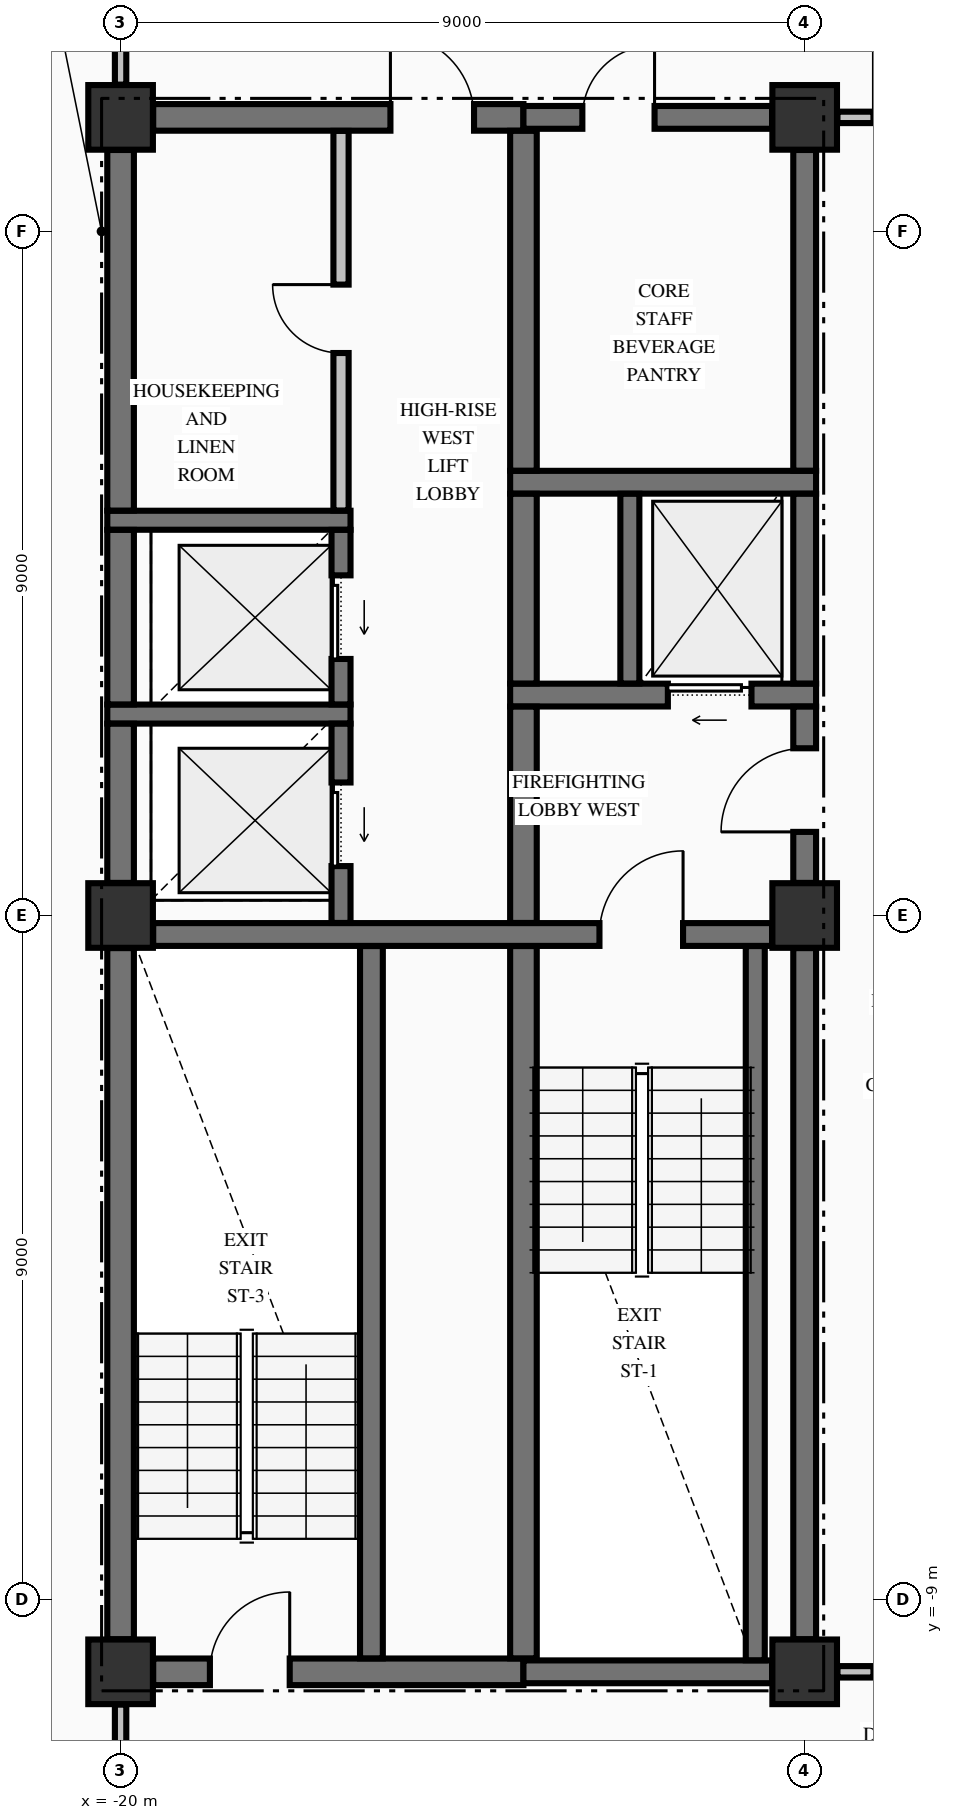
"""IFC4 building model, lengths in metres.
Left out: names, types, materials, properties, quantities, classifications, styles, units other than length and angle.
Written with IfcOpenShell. Run it as: python <this file> out.ifc"""

import sys

from ifc_helpers import new_model, si_unit, direction, frame, frame_2d, origin, origin_2d, place, context, subcontext, project, spatial, rectangle, extrude, element, fill, save


model = new_model("IFC4")
c1 = context("Model", 3, precision=1e-05, world=origin(), true_north=direction((0.0, 1.0)))
c2 = subcontext(c1, "Body", "Model", "MODEL_VIEW")
j1 = project(units=[si_unit("LENGTHUNIT", "METRE"), si_unit("PLANEANGLEUNIT", "RADIAN")], contexts=[c1])
p1 = place(None, origin())
s1 = spatial("IfcSite", under=j1, at=p1, CompositionType="ELEMENT")
p2 = place(p1, origin())
s2 = spatial("IfcBuilding", under=s1, at=p2, CompositionType="ELEMENT")
p3 = place(p2, frame((0.0, 0.0, 179.66)))
s3 = spatial("IfcBuildingStorey", under=s2, at=p3, CompositionType="ELEMENT", Elevation=179.66)
for number, where, z_axis, x_axis in (
    (1, (-20.0, -9.95, -0.25), (0.0, 0.0, 1.0), (1.0, 0.0, 0.0)),
    (2, (-20.0, 10.5, -0.25), (0.0, 0.0, 1.0), (1.0, 0.0, 0.0)),
    (3, (-11.0, -9.95, -0.25), (0.0, 0.0, 1.0), (1.0, 0.0, 0.0)),
    (4, (-11.0, 0.0, -0.25), (0.0, 0.0, 1.0), (1.0, 0.0, 0.0)),
    (5, (-11.0, 10.5, -0.25), (0.0, 0.0, 1.0), (1.0, 0.0, 0.0)),
    (6, (-20.0, 0.0, -0.25), (0.0, 0.0, 1.0), (1.0, 0.0, 0.0)),
):
    element("IfcColumn", number, at=place(p3, frame(where, z_axis=z_axis, x_axis=x_axis)), inside=s3, PredefinedType="COLUMN", context=c2, shape_type="SweptSolid", body=[
        extrude(rectangle(XDim=0.85, YDim=0.85, at=origin_2d()), origin(), (0.0, 0.0, 1.0), 3.4),
    ])
p4 = place(p3, frame((-19.571, -9.95, 0.0), z_axis=(0.0, 0.0, 1.0), x_axis=(1.0, 0.0, 0.0)))
e7 = element("IfcWall", 7, at=p4, inside=s3, PredefinedType="SHEAR", context=c2, shape_type="SweptSolid", body=[
    extrude(rectangle(XDim=4.871, YDim=0.35, at=frame_2d((2.436, 0.0))), origin(), (0.0, 0.0, 1.0), 3.15),
])
p5 = place(p4, frame((0.746, 0.0, 0.0)))
e8 = element("IfcOpeningElement", 8, at=p5, cuts=e7, PredefinedType="OPENING", context=c2, shape_type="SweptSolid", body=[
    extrude(rectangle(XDim=1.05, YDim=2.15, at=frame_2d((0.525, 1.075))), frame((0.0, 0.185, 0.0), z_axis=(0.0, -1.0, 0.0), x_axis=(1.0, 0.0, 0.0)), (0.0, 0.0, 1.0), 0.37),
])
p6 = place(p3, frame((-14.7, -9.95, 0.0), z_axis=(0.0, 0.0, 1.0), x_axis=(1.0, 0.0, 0.0)))
e9 = element("IfcWall", 9, at=p6, inside=s3, PredefinedType="SHEAR", context=c2, shape_type="SweptSolid", body=[
    extrude(rectangle(XDim=3.271, YDim=0.3, at=frame_2d((1.635, 0.0))), origin(), (0.0, 0.0, 1.0), 3.15),
])
p7 = place(p3, frame((-19.571, -0.25, 0.0), z_axis=(0.0, 0.0, 1.0), x_axis=(1.0, 0.0, 0.0)))
e10 = element("IfcWall", 10, at=p7, inside=s3, PredefinedType="SHEAR", context=c2, shape_type="SweptSolid", body=[
    extrude(rectangle(XDim=8.142, YDim=0.3, at=frame_2d((4.071, 0.0))), origin(), (0.0, 0.0, 1.0), 3.15),
])
p8 = place(p7, frame((5.871, 0.0, 0.0)))
e11 = element("IfcOpeningElement", 11, at=p8, cuts=e10, PredefinedType="OPENING", context=c2, shape_type="SweptSolid", body=[
    extrude(rectangle(XDim=1.1, YDim=2.15, at=frame_2d((0.55, 1.075))), frame((0.0, 0.16, 0.0), z_axis=(0.0, -1.0, 0.0), x_axis=(1.0, 0.0, 0.0)), (0.0, 0.0, 1.0), 0.32),
])
p9 = place(p3, frame((-20.175, 2.65, 0.0), z_axis=(0.0, 0.0, 1.0), x_axis=(1.0, 0.0, 0.0)))
e12 = element("IfcWall", 12, at=p9, inside=s3, PredefinedType="SOLIDWALL", context=c2, shape_type="SweptSolid", body=[
    extrude(rectangle(XDim=3.2, YDim=0.25, at=frame_2d((1.6, 0.0))), origin(), (0.0, 0.0, 1.0), 3.15),
])
p10 = place(p3, frame((-14.875, 2.9, 0.0), z_axis=(0.0, 0.0, 1.0), x_axis=(1.0, 0.0, 0.0)))
e13 = element("IfcWall", 13, at=p10, inside=s3, PredefinedType="SHEAR", context=c2, shape_type="SweptSolid", body=[
    extrude(rectangle(XDim=4.025, YDim=0.3, at=frame_2d((2.012, 0.0))), origin(), (0.0, 0.0, 1.0), 3.15),
])
p11 = place(p10, frame((2.075, 0.0, 0.0)))
e14 = element("IfcOpeningElement", 14, at=p11, cuts=e13, PredefinedType="OPENING", context=c2, shape_type="SweptSolid", body=[
    extrude(rectangle(XDim=1.1, YDim=2.2, at=frame_2d((0.55, 1.1))), frame((0.0, 0.16, 0.0), z_axis=(0.0, -1.0, 0.0), x_axis=(1.0, 0.0, 0.0)), (0.0, 0.0, 1.0), 0.32),
])
p12 = place(p3, frame((-20.175, 5.2, 0.0), z_axis=(0.0, 0.0, 1.0), x_axis=(1.0, 0.0, 0.0)))
e15 = element("IfcWall", 15, at=p12, inside=s3, PredefinedType="SOLIDWALL", context=c2, shape_type="SweptSolid", body=[
    extrude(rectangle(XDim=3.2, YDim=0.25, at=frame_2d((1.6, 0.0))), origin(), (0.0, 0.0, 1.0), 3.15),
])
p13 = place(p3, frame((-14.875, 5.7, 0.0), z_axis=(0.0, 0.0, 1.0), x_axis=(1.0, 0.0, 0.0)))
e16 = element("IfcWall", 16, at=p13, inside=s3, PredefinedType="SHEAR", context=c2, shape_type="SweptSolid", body=[
    extrude(rectangle(XDim=4.025, YDim=0.3, at=frame_2d((2.012, 0.0))), origin(), (0.0, 0.0, 1.0), 3.15),
])
p14 = place(p3, frame((-19.571, 10.5, 0.0), z_axis=(0.0, 0.0, 1.0), x_axis=(1.0, 0.0, 0.0)))
e17 = element("IfcWall", 17, at=p14, inside=s3, PredefinedType="SHEAR", context=c2, shape_type="SweptSolid", body=[
    extrude(rectangle(XDim=4.871, YDim=0.35, at=frame_2d((2.436, 0.0))), origin(), (0.0, 0.0, 1.0), 3.15),
])
p15 = place(p14, frame((3.121, 0.0, 0.0)))
e18 = element("IfcOpeningElement", 18, at=p15, cuts=e17, PredefinedType="OPENING", context=c2, shape_type="SweptSolid", body=[
    extrude(rectangle(XDim=1.1, YDim=2.15, at=frame_2d((0.55, 1.075))), frame((0.0, 0.185, 0.0), z_axis=(0.0, -1.0, 0.0), x_axis=(1.0, 0.0, 0.0)), (0.0, 0.0, 1.0), 0.37),
])
p16 = place(p3, frame((-14.7, 10.5, 0.0), z_axis=(0.0, 0.0, 1.0), x_axis=(1.0, 0.0, 0.0)))
e19 = element("IfcWall", 19, at=p16, inside=s3, PredefinedType="SHEAR", context=c2, shape_type="SweptSolid", body=[
    extrude(rectangle(XDim=3.271, YDim=0.3, at=frame_2d((1.635, 0.0))), origin(), (0.0, 0.0, 1.0), 3.15),
])
p17 = place(p16, frame((0.775, 0.0, 0.0)))
e20 = element("IfcOpeningElement", 20, at=p17, cuts=e19, PredefinedType="OPENING", context=c2, shape_type="SweptSolid", body=[
    extrude(rectangle(XDim=0.95, YDim=2.15, at=frame_2d((0.475, 1.075))), frame((0.0, 0.16, 0.0), z_axis=(0.0, -1.0, 0.0), x_axis=(1.0, 0.0, 0.0)), (0.0, 0.0, 1.0), 0.32),
])
p18 = place(p3, frame((-10.569, -9.95, 0.0), z_axis=(0.0, 0.0, 1.0), x_axis=(1.0, 0.0, 0.0)))
e21 = element("IfcWall", 21, at=p18, inside=s3, PredefinedType="PARTITIONING", context=c2, shape_type="SweptSolid", body=[
    extrude(rectangle(XDim=21.138, YDim=0.15, at=frame_2d((10.569, 0.0))), origin(), (0.0, 0.0, 1.0), 3.15),
])
p19 = place(p18, frame((0.474, 0.0, 0.0)))
e22 = element("IfcOpeningElement", 22, at=p19, cuts=e21, PredefinedType="OPENING", context=c2, shape_type="SweptSolid", body=[
    extrude(rectangle(XDim=1.05, YDim=2.15, at=frame_2d((0.525, 1.075))), frame((0.0, 0.085, 0.0), z_axis=(0.0, -1.0, 0.0), x_axis=(1.0, 0.0, 0.0)), (0.0, 0.0, 1.0), 0.17),
])
p20 = place(p18, frame((19.614, 0.0, 0.0)))
e23 = element("IfcOpeningElement", 23, at=p20, cuts=e21, PredefinedType="OPENING", context=c2, shape_type="SweptSolid", body=[
    extrude(rectangle(XDim=1.05, YDim=2.15, at=frame_2d((0.525, 1.075))), frame((0.0, 0.085, 0.0), z_axis=(0.0, -1.0, 0.0), x_axis=(1.0, 0.0, 0.0)), (0.0, 0.0, 1.0), 0.17),
])
p21 = place(p18, frame((11.774, 0.0, 0.0)))
e24 = element("IfcOpeningElement", 24, at=p21, cuts=e21, PredefinedType="OPENING", context=c2, shape_type="SweptSolid", body=[
    extrude(rectangle(XDim=0.95, YDim=2.15, at=frame_2d((0.475, 1.075))), frame((0.0, 0.085, 0.0), z_axis=(0.0, -1.0, 0.0), x_axis=(1.0, 0.0, 0.0)), (0.0, 0.0, 1.0), 0.17),
])
p22 = place(p3, frame((-10.569, 10.5, 0.0), z_axis=(0.0, 0.0, 1.0), x_axis=(1.0, 0.0, 0.0)))
e25 = element("IfcWall", 25, at=p22, inside=s3, PredefinedType="PARTITIONING", context=c2, shape_type="SweptSolid", body=[
    extrude(rectangle(XDim=21.138, YDim=0.15, at=frame_2d((10.569, 0.0))), origin(), (0.0, 0.0, 1.0), 3.15),
])
p23 = place(p22, frame((0.474, 0.0, 0.0)))
e26 = element("IfcOpeningElement", 26, at=p23, cuts=e25, PredefinedType="OPENING", context=c2, shape_type="SweptSolid", body=[
    extrude(rectangle(XDim=1.05, YDim=2.15, at=frame_2d((0.525, 1.075))), frame((0.0, 0.085, 0.0), z_axis=(0.0, -1.0, 0.0), x_axis=(1.0, 0.0, 0.0)), (0.0, 0.0, 1.0), 0.17),
])
p24 = place(p22, frame((19.614, 0.0, 0.0)))
e27 = element("IfcOpeningElement", 27, at=p24, cuts=e25, PredefinedType="OPENING", context=c2, shape_type="SweptSolid", body=[
    extrude(rectangle(XDim=1.05, YDim=2.15, at=frame_2d((0.525, 1.075))), frame((0.0, 0.085, 0.0), z_axis=(0.0, -1.0, 0.0), x_axis=(1.0, 0.0, 0.0)), (0.0, 0.0, 1.0), 0.17),
])
p25 = place(p3, frame((-20.0, -9.521, 0.0), z_axis=(0.0, 0.0, 1.0), x_axis=(0.0, 1.0, 0.0)))
e28 = element("IfcWall", 28, at=p25, inside=s3, PredefinedType="SHEAR", context=c2, shape_type="SweptSolid", body=[
    extrude(rectangle(XDim=9.092, YDim=0.35, at=frame_2d((4.546, 0.0))), origin(), (0.0, 0.0, 1.0), 3.15),
])
p26 = place(p3, frame((-20.0, 0.429, 0.0), z_axis=(0.0, 0.0, 1.0), x_axis=(0.0, 1.0, 0.0)))
e29 = element("IfcWall", 29, at=p26, inside=s3, PredefinedType="SHEAR", context=c2, shape_type="SweptSolid", body=[
    extrude(rectangle(XDim=2.094, YDim=0.35, at=frame_2d((1.047, 0.0))), origin(), (0.0, 0.0, 1.0), 3.15),
])
p27 = place(p3, frame((-20.0, 2.777, 0.0), z_axis=(0.0, 0.0, 1.0), x_axis=(0.0, 1.0, 0.0)))
e30 = element("IfcWall", 30, at=p27, inside=s3, PredefinedType="SHEAR", context=c2, shape_type="SweptSolid", body=[
    extrude(rectangle(XDim=2.296, YDim=0.35, at=frame_2d((1.148, 0.0))), origin(), (0.0, 0.0, 1.0), 3.15),
])
p28 = place(p3, frame((-20.0, 5.327, 0.0), z_axis=(0.0, 0.0, 1.0), x_axis=(0.0, 1.0, 0.0)))
e31 = element("IfcWall", 31, at=p28, inside=s3, PredefinedType="SHEAR", context=c2, shape_type="SweptSolid", body=[
    extrude(rectangle(XDim=4.744, YDim=0.35, at=frame_2d((2.372, 0.0))), origin(), (0.0, 0.0, 1.0), 3.15),
])
p29 = place(p3, frame((-17.1, -0.098, 0.0), z_axis=(0.0, 0.0, 1.0), x_axis=(0.0, 1.0, 0.0)))
e32 = element("IfcWall", 32, at=p29, inside=s3, PredefinedType="SOLIDWALL", context=c2, shape_type="SweptSolid", body=[
    extrude(rectangle(XDim=2.621, YDim=0.25, at=frame_2d((1.311, 0.0))), origin(), (0.0, 0.0, 1.0), 3.15),
])
p30 = place(p29, frame((0.748, 0.0, 0.0)))
e33 = element("IfcOpeningElement", 33, at=p30, cuts=e32, PredefinedType="OPENING", context=c2, shape_type="SweptSolid", body=[
    extrude(rectangle(XDim=1.1, YDim=2.2, at=frame_2d((0.55, 1.1))), frame((0.0, 0.135, 0.0), z_axis=(0.0, -1.0, 0.0), x_axis=(1.0, 0.0, 0.0)), (0.0, 0.0, 1.0), 0.27),
])
p31 = place(p3, frame((-17.1, 2.777, 0.0), z_axis=(0.0, 0.0, 1.0), x_axis=(0.0, 1.0, 0.0)))
e34 = element("IfcWall", 34, at=p31, inside=s3, PredefinedType="SOLIDWALL", context=c2, shape_type="SweptSolid", body=[
    extrude(rectangle(XDim=2.296, YDim=0.25, at=frame_2d((1.148, 0.0))), origin(), (0.0, 0.0, 1.0), 3.15),
])
p32 = place(p31, frame((0.598, 0.0, 0.0)))
e35 = element("IfcOpeningElement", 35, at=p32, cuts=e34, PredefinedType="OPENING", context=c2, shape_type="SweptSolid", body=[
    extrude(rectangle(XDim=1.1, YDim=2.2, at=frame_2d((0.55, 1.1))), frame((0.0, 0.135, 0.0), z_axis=(0.0, -1.0, 0.0), x_axis=(1.0, 0.0, 0.0)), (0.0, 0.0, 1.0), 0.27),
])
p33 = place(p3, frame((-16.7, -9.773, 0.0), z_axis=(0.0, 0.0, 1.0), x_axis=(0.0, 1.0, 0.0)))
e36 = element("IfcWall", 36, at=p33, inside=s3, PredefinedType="SHEAR", context=c2, shape_type="SweptSolid", body=[
    extrude(rectangle(XDim=9.371, YDim=0.3, at=frame_2d((4.686, 0.0))), origin(), (0.0, 0.0, 1.0), 3.15),
])
p34 = place(p3, frame((-14.7, -9.773, 0.0), z_axis=(0.0, 0.0, 1.0), x_axis=(0.0, 1.0, 0.0)))
e37 = element("IfcWall", 37, at=p34, inside=s3, PredefinedType="SHEAR", context=c2, shape_type="SweptSolid", body=[
    extrude(rectangle(XDim=9.371, YDim=0.35, at=frame_2d((4.686, 0.0))), origin(), (0.0, 0.0, 1.0), 3.15),
])
p35 = place(p3, frame((-14.7, -0.098, 0.0), z_axis=(0.0, 0.0, 1.0), x_axis=(0.0, 1.0, 0.0)))
e38 = element("IfcWall", 38, at=p35, inside=s3, PredefinedType="SHEAR", context=c2, shape_type="SweptSolid", body=[
    extrude(rectangle(XDim=2.846, YDim=0.35, at=frame_2d((1.423, 0.0))), origin(), (0.0, 0.0, 1.0), 3.15),
])
p36 = place(p3, frame((-14.7, 3.052, 0.0), z_axis=(0.0, 0.0, 1.0), x_axis=(0.0, 1.0, 0.0)))
e39 = element("IfcWall", 39, at=p36, inside=s3, PredefinedType="SHEAR", context=c2, shape_type="SweptSolid", body=[
    extrude(rectangle(XDim=2.496, YDim=0.35, at=frame_2d((1.248, 0.0))), origin(), (0.0, 0.0, 1.0), 3.15),
])
p37 = place(p3, frame((-14.7, 5.852, 0.0), z_axis=(0.0, 0.0, 1.0), x_axis=(0.0, 1.0, 0.0)))
e40 = element("IfcWall", 40, at=p37, inside=s3, PredefinedType="SHEAR", context=c2, shape_type="SweptSolid", body=[
    extrude(rectangle(XDim=4.471, YDim=0.35, at=frame_2d((2.235, 0.0))), origin(), (0.0, 0.0, 1.0), 3.15),
])
p38 = place(p3, frame((-13.3, 3.052, 0.0), z_axis=(0.0, 0.0, 1.0), x_axis=(0.0, 1.0, 0.0)))
e41 = element("IfcWall", 41, at=p38, inside=s3, PredefinedType="SOLIDWALL", context=c2, shape_type="SweptSolid", body=[
    extrude(rectangle(XDim=2.496, YDim=0.25, at=frame_2d((1.248, 0.0))), origin(), (0.0, 0.0, 1.0), 3.15),
])
p39 = place(p3, frame((-11.65, -9.798, 0.0), z_axis=(0.0, 0.0, 1.0), x_axis=(0.0, 1.0, 0.0)))
e42 = element("IfcWall", 42, at=p39, inside=s3, PredefinedType="SOLIDWALL", context=c2, shape_type="SweptSolid", body=[
    extrude(rectangle(XDim=9.396, YDim=0.25, at=frame_2d((4.698, 0.0))), origin(), (0.0, 0.0, 1.0), 3.15),
])
p40 = place(p3, frame((-11.0, -9.521, 0.0), z_axis=(0.0, 0.0, 1.0), x_axis=(0.0, 1.0, 0.0)))
e43 = element("IfcWall", 43, at=p40, inside=s3, PredefinedType="SHEAR", context=c2, shape_type="SweptSolid", body=[
    extrude(rectangle(XDim=9.092, YDim=0.3, at=frame_2d((4.546, 0.0))), origin(), (0.0, 0.0, 1.0), 3.15),
])
p41 = place(p3, frame((-11.0, 0.429, 0.0), z_axis=(0.0, 0.0, 1.0), x_axis=(0.0, 1.0, 0.0)))
e44 = element("IfcWall", 44, at=p41, inside=s3, PredefinedType="SHEAR", context=c2, shape_type="SweptSolid", body=[
    extrude(rectangle(XDim=2.319, YDim=0.3, at=frame_2d((1.16, 0.0))), origin(), (0.0, 0.0, 1.0), 3.15),
])
p42 = place(p41, frame((0.671, 0.0, 0.0)))
e45 = element("IfcOpeningElement", 45, at=p42, cuts=e44, PredefinedType="OPENING", context=c2, shape_type="SweptSolid", body=[
    extrude(rectangle(XDim=1.1, YDim=2.15, at=frame_2d((0.55, 1.075))), frame((0.0, 0.16, 0.0), z_axis=(0.0, -1.0, 0.0), x_axis=(1.0, 0.0, 0.0)), (0.0, 0.0, 1.0), 0.32),
])
p43 = place(p3, frame((-11.0, 3.052, 0.0), z_axis=(0.0, 0.0, 1.0), x_axis=(0.0, 1.0, 0.0)))
e46 = element("IfcWall", 46, at=p43, inside=s3, PredefinedType="SHEAR", context=c2, shape_type="SweptSolid", body=[
    extrude(rectangle(XDim=2.496, YDim=0.3, at=frame_2d((1.248, 0.0))), origin(), (0.0, 0.0, 1.0), 3.15),
])
p44 = place(p3, frame((-11.0, 5.852, 0.0), z_axis=(0.0, 0.0, 1.0), x_axis=(0.0, 1.0, 0.0)))
e47 = element("IfcWall", 47, at=p44, inside=s3, PredefinedType="SHEAR", context=c2, shape_type="SweptSolid", body=[
    extrude(rectangle(XDim=4.219, YDim=0.3, at=frame_2d((2.109, 0.0))), origin(), (0.0, 0.0, 1.0), 3.15),
])
p45 = place(p3, frame((-20.0, -12.122, 0.0), z_axis=(0.0, 0.0, 1.0), x_axis=(0.0, 1.0, 0.0)))
e48 = element("IfcWall", 48, at=p45, inside=s3, PredefinedType="PARTITIONING", context=c2, shape_type="SweptSolid", body=[
    extrude(rectangle(XDim=1.741, YDim=0.15, at=frame_2d((0.871, 0.0))), origin(), (0.0, 0.0, 1.0), 2.342),
])
p46 = place(p3, frame((-20.0, 10.931, 0.0), z_axis=(0.0, 0.0, 1.0), x_axis=(0.0, 1.0, 0.0)))
e49 = element("IfcWall", 49, at=p46, inside=s3, PredefinedType="PARTITIONING", context=c2, shape_type="SweptSolid", body=[
    extrude(rectangle(XDim=2.541, YDim=0.15, at=frame_2d((1.271, 0.0))), origin(), (0.0, 0.0, 1.0), 2.342),
])
p47 = place(p3, frame((-17.1, 5.328, 0.0), z_axis=(0.0, 0.0, 1.0), x_axis=(0.0, 1.0, 0.0)))
e50 = element("IfcWall", 50, at=p47, inside=s3, PredefinedType="PARTITIONING", context=c2, shape_type="SweptSolid", body=[
    extrude(rectangle(XDim=4.994, YDim=0.2, at=frame_2d((2.497, 0.0))), origin(), (0.0, 0.0, 1.0), 3.15),
])
p48 = place(p47, frame((2.072, 0.0, 0.0)))
e51 = element("IfcOpeningElement", 51, at=p48, cuts=e50, PredefinedType="OPENING", context=c2, shape_type="SweptSolid", body=[
    extrude(rectangle(XDim=0.9, YDim=2.15, at=frame_2d((0.45, 1.075))), frame((0.0, 0.11, 0.0), z_axis=(0.0, -1.0, 0.0), x_axis=(1.0, 0.0, 0.0)), (0.0, 0.0, 1.0), 0.22),
])
p49 = place(p8, origin())
e52 = element("IfcDoor", 52, at=p49, inside=s3, OperationType="SINGLE_SWING_RIGHT", PredefinedType="DOOR", context=c2, shape_type="SweptSolid", body=[
    extrude(rectangle(XDim=1.1, YDim=2.15, at=frame_2d((0.55, 1.075))), frame((0.0, 0.025, 0.0), z_axis=(0.0, -1.0, 0.0), x_axis=(1.0, 0.0, 0.0)), (0.0, 0.0, 1.0), 0.05),
])
fill(e11, e52)
p50 = place(p42, origin())
e53 = element("IfcDoor", 53, at=p50, inside=s3, OperationType="SINGLE_SWING_LEFT", PredefinedType="DOOR", context=c2, shape_type="SweptSolid", body=[
    extrude(rectangle(XDim=1.1, YDim=2.15, at=frame_2d((0.55, 1.075))), frame((0.0, 0.025, 0.0), z_axis=(0.0, -1.0, 0.0), x_axis=(1.0, 0.0, 0.0)), (0.0, 0.0, 1.0), 0.05),
])
fill(e45, e53)
p51 = place(p11, origin())
e54 = element("IfcDoor", 54, at=p51, inside=s3, OperationType="SLIDING_TO_LEFT", PredefinedType="DOOR", context=c2, shape_type="SweptSolid", body=[
    extrude(rectangle(XDim=1.1, YDim=2.2, at=frame_2d((0.55, 1.1))), frame((0.0, 0.025, 0.0), z_axis=(0.0, -1.0, 0.0), x_axis=(1.0, 0.0, 0.0)), (0.0, 0.0, 1.0), 0.05),
])
fill(e14, e54)
p52 = place(p17, origin())
e55 = element("IfcDoor", 55, at=p52, inside=s3, OperationType="SINGLE_SWING_RIGHT", PredefinedType="DOOR", context=c2, shape_type="SweptSolid", body=[
    extrude(rectangle(XDim=0.95, YDim=2.15, at=frame_2d((0.475, 1.075))), frame((0.0, 0.025, 0.0), z_axis=(0.0, -1.0, 0.0), x_axis=(1.0, 0.0, 0.0)), (0.0, 0.0, 1.0), 0.05),
])
fill(e20, e55)
p53 = place(p5, origin())
e56 = element("IfcDoor", 56, at=p53, inside=s3, OperationType="SINGLE_SWING_RIGHT", PredefinedType="DOOR", context=c2, shape_type="SweptSolid", body=[
    extrude(rectangle(XDim=1.05, YDim=2.15, at=frame_2d((0.525, 1.075))), frame((0.0, 0.025, 0.0), z_axis=(0.0, -1.0, 0.0), x_axis=(1.0, 0.0, 0.0)), (0.0, 0.0, 1.0), 0.05),
])
fill(e8, e56)
p54 = place(p30, origin())
e57 = element("IfcDoor", 57, at=p54, inside=s3, OperationType="SLIDING_TO_LEFT", PredefinedType="DOOR", context=c2, shape_type="SweptSolid", body=[
    extrude(rectangle(XDim=1.1, YDim=2.2, at=frame_2d((0.55, 1.1))), frame((0.0, 0.025, 0.0), z_axis=(0.0, -1.0, 0.0), x_axis=(1.0, 0.0, 0.0)), (0.0, 0.0, 1.0), 0.05),
])
fill(e33, e57)
p55 = place(p32, origin())
e58 = element("IfcDoor", 58, at=p55, inside=s3, OperationType="SLIDING_TO_LEFT", PredefinedType="DOOR", context=c2, shape_type="SweptSolid", body=[
    extrude(rectangle(XDim=1.1, YDim=2.2, at=frame_2d((0.55, 1.1))), frame((0.0, 0.025, 0.0), z_axis=(0.0, -1.0, 0.0), x_axis=(1.0, 0.0, 0.0)), (0.0, 0.0, 1.0), 0.05),
])
fill(e35, e58)
p56 = place(p15, origin())
e59 = element("IfcDoor", 59, at=p56, inside=s3, OperationType="SINGLE_SWING_LEFT", PredefinedType="DOOR", context=c2, shape_type="SweptSolid", body=[
    extrude(rectangle(XDim=1.1, YDim=2.15, at=frame_2d((0.55, 1.075))), frame((0.0, 0.025, 0.0), z_axis=(0.0, -1.0, 0.0), x_axis=(1.0, 0.0, 0.0)), (0.0, 0.0, 1.0), 0.05),
])
fill(e18, e59)
p57 = place(p48, origin())
e60 = element("IfcDoor", 60, at=p57, inside=s3, OperationType="SINGLE_SWING_RIGHT", PredefinedType="DOOR", context=c2, shape_type="SweptSolid", body=[
    extrude(rectangle(XDim=0.9, YDim=2.15, at=frame_2d((0.45, 1.075))), frame((0.0, 0.025, 0.0), z_axis=(0.0, -1.0, 0.0), x_axis=(1.0, 0.0, 0.0)), (0.0, 0.0, 1.0), 0.05),
])
fill(e51, e60)
save(model, sys.argv[1])
